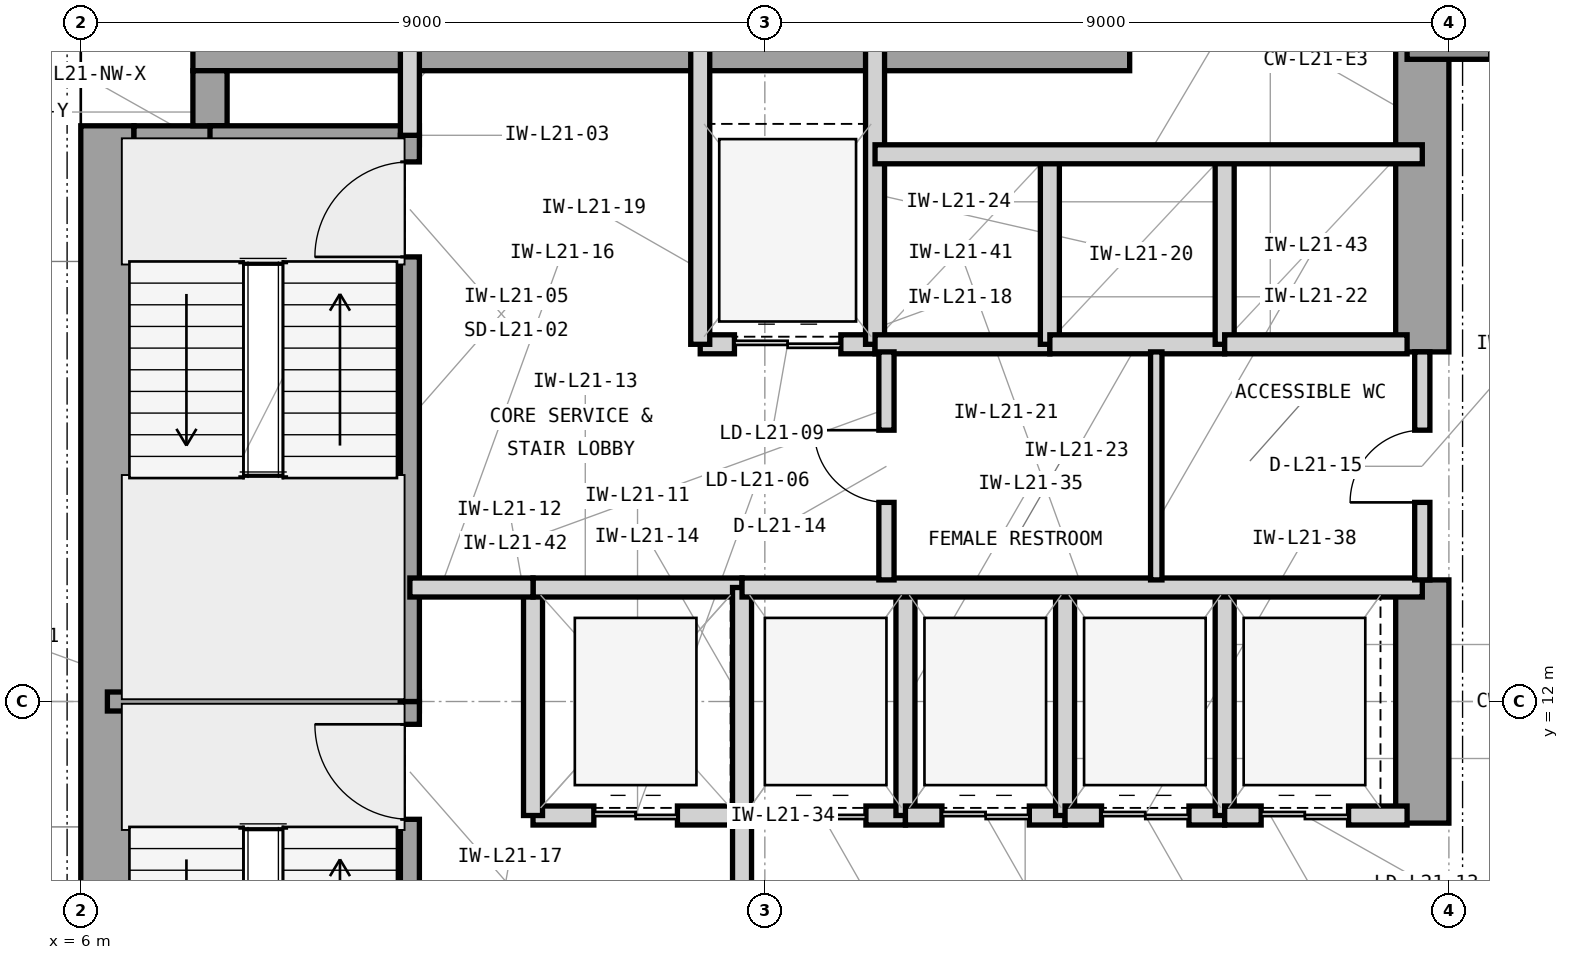
"""IFC4 building model, lengths in metres.
Left out: names, types, materials, properties, quantities, classifications, styles, units other than length and angle.
Written with IfcOpenShell. Run it as: python <this file> out.ifc"""

import sys

from ifc_helpers import new_model, si_unit, direction, frame, frame_2d, origin, origin_2d, place, context, subcontext, project, spatial, rectangle, extrude, element, fill, save


model = new_model("IFC4")
c1 = context("Model", 3, precision=1e-05, world=origin(), true_north=direction((0.0, 1.0)))
c2 = subcontext(c1, "Body", "Model", "MODEL_VIEW")
j1 = project(units=[si_unit("LENGTHUNIT", "METRE"), si_unit("PLANEANGLEUNIT", "RADIAN")], contexts=[c1])
p1 = place(None, origin())
s1 = spatial("IfcSite", under=j1, at=p1, CompositionType="ELEMENT")
p2 = place(p1, origin())
s2 = spatial("IfcBuilding", under=s1, at=p2, CompositionType="ELEMENT")
p3 = place(p2, frame((0.0, 0.0, 93.3)))
s3 = spatial("IfcBuildingStorey", under=s2, at=p3, CompositionType="ELEMENT", Elevation=93.3)
p4 = place(p3, frame((6.35, 4.425, 0.0), z_axis=(0.0, 0.0, 1.0), x_axis=(0.0, 1.0, 0.0)))
e1 = element("IfcWall", 1, at=p4, inside=s3, PredefinedType="SHEAR", context=c2, shape_type="SweptSolid", body=[
    extrude(rectangle(XDim=15.15, YDim=0.7, at=frame_2d((7.575, 0.0))), origin(), (0.0, 0.0, 1.0), 3.9),
])
p5 = place(p3, frame((7.475, 20.65, 0.0), z_axis=(0.0, 0.0, 1.0), x_axis=(1.0, 0.0, 0.0)))
e2 = element("IfcWall", 2, at=p5, inside=s3, PredefinedType="SHEAR", context=c2, shape_type="SweptSolid", body=[
    extrude(rectangle(XDim=12.325, YDim=0.7, at=frame_2d((6.163, 0.0))), origin(), (0.0, 0.0, 1.0), 3.9),
])
p6 = place(p3, frame((23.65, 10.4, 0.0), z_axis=(0.0, 0.0, 1.0), x_axis=(0.0, 1.0, 0.0)))
e3 = element("IfcWall", 3, at=p6, inside=s3, PredefinedType="SHEAR", context=c2, shape_type="SweptSolid", body=[
    extrude(rectangle(XDim=3.2, YDim=0.7, at=frame_2d((1.6, 0.0))), origin(), (0.0, 0.0, 1.0), 3.9),
])
p7 = place(p3, frame((23.65, 16.6, 0.0), z_axis=(0.0, 0.0, 1.0), x_axis=(0.0, 1.0, 0.0)))
e4 = element("IfcWall", 4, at=p7, inside=s3, PredefinedType="SHEAR", context=c2, shape_type="SweptSolid", body=[
    extrude(rectangle(XDim=4.05, YDim=0.7, at=frame_2d((2.025, 0.0))), origin(), (0.0, 0.0, 1.0), 3.9),
])
p8 = place(p3, frame((6.7, 19.35, 0.0), z_axis=(0.0, 0.0, 1.0), x_axis=(1.0, 0.0, 0.0)))
e5 = element("IfcWall", 5, at=p8, inside=s3, PredefinedType="SHEAR", context=c2, shape_type="SweptSolid", body=[
    extrude(rectangle(XDim=1.225, YDim=0.45, at=frame_2d((0.613, 0.0))), origin(), (0.0, 0.0, 1.0), 3.9),
])
p9 = place(p3, frame((7.7, 19.575, 0.0), z_axis=(0.0, 0.0, 1.0), x_axis=(0.0, 1.0, 0.0)))
e6 = element("IfcWall", 6, at=p9, inside=s3, PredefinedType="SHEAR", context=c2, shape_type="SweptSolid", body=[
    extrude(rectangle(XDim=0.725, YDim=0.45, at=frame_2d((0.363, 0.0))), origin(), (0.0, 0.0, 1.0), 3.9),
])
p10 = place(p3, frame((24.0, 21.0, 0.0), z_axis=(0.0, 0.0, 1.0), x_axis=(1.0, 0.0, 0.0)))
e7 = element("IfcColumn", 7, at=p10, inside=s3, PredefinedType="COLUMN", context=c2, shape_type="SweptSolid", body=[
    extrude(rectangle(XDim=1.1, YDim=1.1, at=origin_2d()), origin(), (0.0, 0.0, 1.0), 3.9),
])
p11 = place(p3, frame((6.35, 12.0, 0.0), z_axis=(0.0, 0.0, 1.0), x_axis=(1.0, 0.0, 0.0)))
e8 = element("IfcWall", 8, at=p11, inside=s3, PredefinedType="SHEAR", context=c2, shape_type="SweptSolid", body=[
    extrude(rectangle(XDim=4.105, YDim=0.25, at=frame_2d((2.052, 0.0))), origin(), (0.0, 0.0, 1.0), 3.9),
])
p12 = place(p3, frame((7.7, 19.45, 0.0), z_axis=(0.0, 0.0, 1.0), x_axis=(1.0, 0.0, 0.0)))
e9 = element("IfcWall", 9, at=p12, inside=s3, PredefinedType="SHEAR", context=c2, shape_type="SweptSolid", body=[
    extrude(rectangle(XDim=2.755, YDim=0.25, at=frame_2d((1.377, 0.0))), origin(), (0.0, 0.0, 1.0), 3.9),
])
p13 = place(p3, frame((10.33, 4.55, 0.0), z_axis=(0.0, 0.0, 1.0), x_axis=(0.0, 1.0, 0.0)))
e10 = element("IfcWall", 10, at=p13, inside=s3, PredefinedType="SHEAR", context=c2, shape_type="SweptSolid", body=[
    extrude(rectangle(XDim=7.45, YDim=0.25, at=frame_2d((3.725, 0.0))), origin(), (0.0, 0.0, 1.0), 3.9),
])
p14 = place(p13, frame((5.9, 0.0, 0.0)))
e11 = element("IfcOpeningElement", 11, at=p14, cuts=e10, PredefinedType="OPENING", context=c2, shape_type="SweptSolid", body=[
    extrude(rectangle(XDim=1.25, YDim=2.2, at=frame_2d((0.625, 1.1))), frame((0.0, 0.135, 0.0), z_axis=(0.0, -1.0, 0.0), x_axis=(1.0, 0.0, 0.0)), (0.0, 0.0, 1.0), 0.27),
])
p15 = place(p3, frame((10.33, 12.0, 0.0), z_axis=(0.0, 0.0, 1.0), x_axis=(0.0, 1.0, 0.0)))
e12 = element("IfcWall", 12, at=p15, inside=s3, PredefinedType="SHEAR", context=c2, shape_type="SweptSolid", body=[
    extrude(rectangle(XDim=7.45, YDim=0.25, at=frame_2d((3.725, 0.0))), origin(), (0.0, 0.0, 1.0), 3.9),
])
p16 = place(p15, frame((5.85, 0.0, 0.0)))
e13 = element("IfcOpeningElement", 13, at=p16, cuts=e12, PredefinedType="OPENING", context=c2, shape_type="SweptSolid", body=[
    extrude(rectangle(XDim=1.25, YDim=2.2, at=frame_2d((0.625, 1.1))), frame((0.0, 0.135, 0.0), z_axis=(0.0, -1.0, 0.0), x_axis=(1.0, 0.0, 0.0)), (0.0, 0.0, 1.0), 0.27),
])
p17 = place(p3, frame((10.33, 19.45, 0.0), z_axis=(0.0, 0.0, 1.0), x_axis=(0.0, 1.0, 0.0)))
e14 = element("IfcWall", 14, at=p17, inside=s3, PredefinedType="PARTITIONING", context=c2, shape_type="SweptSolid", body=[
    extrude(rectangle(XDim=1.2, YDim=0.25, at=frame_2d((0.6, 0.0))), origin(), (0.0, 0.0, 1.0), 2.917),
])
p18 = place(p3, frame((11.95, 10.5, 0.0), z_axis=(0.0, 0.0, 1.0), x_axis=(1.0, 0.0, 0.0)))
e15 = element("IfcWall", 15, at=p18, inside=s3, PredefinedType="PARTITIONING", context=c2, shape_type="SweptSolid", body=[
    extrude(rectangle(XDim=2.75, YDim=0.25, at=frame_2d((1.375, 0.0))), origin(), (0.0, 0.0, 1.0), 3.227),
])
p19 = place(p18, frame((0.8, 0.0, 0.0)))
e16 = element("IfcOpeningElement", 16, at=p19, cuts=e15, PredefinedType="OPENING", context=c2, shape_type="SweptSolid", body=[
    extrude(rectangle(XDim=1.1, YDim=2.25, at=frame_2d((0.55, 1.125))), frame((0.0, 0.135, 0.0), z_axis=(0.0, -1.0, 0.0), x_axis=(1.0, 0.0, 0.0)), (0.0, 0.0, 1.0), 0.27),
])
p20 = place(p3, frame((11.95, 10.5, 0.0), z_axis=(0.0, 0.0, 1.0), x_axis=(0.0, 1.0, 0.0)))
e17 = element("IfcWall", 17, at=p20, inside=s3, PredefinedType="PARTITIONING", context=c2, shape_type="SweptSolid", body=[
    extrude(rectangle(XDim=3.0, YDim=0.25, at=frame_2d((1.5, 0.0))), origin(), (0.0, 0.0, 1.0), 3.69),
])
p21 = place(p3, frame((11.95, 13.5, 0.0), z_axis=(0.0, 0.0, 1.0), x_axis=(1.0, 0.0, 0.0)))
e18 = element("IfcWall", 18, at=p21, inside=s3, PredefinedType="PARTITIONING", context=c2, shape_type="SweptSolid", body=[
    extrude(rectangle(XDim=2.75, YDim=0.25, at=frame_2d((1.375, 0.0))), origin(), (0.0, 0.0, 1.0), 3.227),
])
p22 = place(p3, frame((14.7, 10.5, 0.0), z_axis=(0.0, 0.0, 1.0), x_axis=(0.0, 1.0, 0.0)))
e19 = element("IfcWall", 19, at=p22, inside=s3, PredefinedType="PARTITIONING", context=c2, shape_type="SweptSolid", body=[
    extrude(rectangle(XDim=3.0, YDim=0.25, at=frame_2d((1.5, 0.0))), origin(), (0.0, 0.0, 1.0), 3.69),
])
p23 = place(p3, frame((14.7, 6.7, 0.0), z_axis=(0.0, 0.0, 1.0), x_axis=(0.0, 1.0, 0.0)))
e20 = element("IfcWall", 20, at=p23, inside=s3, PredefinedType="PARTITIONING", context=c2, shape_type="SweptSolid", body=[
    extrude(rectangle(XDim=3.8, YDim=0.25, at=frame_2d((1.9, 0.0))), origin(), (0.0, 0.0, 1.0), 3.69),
])
p24 = place(p23, frame((1.3, 0.0, 0.0)))
e21 = element("IfcOpeningElement", 21, at=p24, cuts=e20, PredefinedType="OPENING", context=c2, shape_type="SweptSolid", body=[
    extrude(rectangle(XDim=1.2, YDim=2.2, at=frame_2d((0.6, 1.1))), frame((0.0, 0.135, 0.0), z_axis=(0.0, -1.0, 0.0), x_axis=(1.0, 0.0, 0.0)), (0.0, 0.0, 1.0), 0.27),
])
p25 = place(p3, frame((10.33, 13.5, 0.0), z_axis=(0.0, 0.0, 1.0), x_axis=(1.0, 0.0, 0.0)))
e22 = element("IfcWall", 22, at=p25, inside=s3, PredefinedType="PARTITIONING", context=c2, shape_type="SweptSolid", body=[
    extrude(rectangle(XDim=1.62, YDim=0.25, at=frame_2d((0.81, 0.0))), origin(), (0.0, 0.0, 1.0), 3.227),
])
p26 = place(p3, frame((14.15, 16.7, 0.0), z_axis=(0.0, 0.0, 1.0), x_axis=(1.0, 0.0, 0.0)))
e23 = element("IfcWall", 23, at=p26, inside=s3, PredefinedType="PARTITIONING", context=c2, shape_type="SweptSolid", body=[
    extrude(rectangle(XDim=2.3, YDim=0.25, at=frame_2d((1.15, 0.0))), origin(), (0.0, 0.0, 1.0), 3.227),
])
p27 = place(p26, frame((0.45, 0.0, 0.0)))
e24 = element("IfcOpeningElement", 24, at=p27, cuts=e23, PredefinedType="OPENING", context=c2, shape_type="SweptSolid", body=[
    extrude(rectangle(XDim=1.4, YDim=2.35, at=frame_2d((0.7, 1.175))), frame((0.0, 0.135, 0.0), z_axis=(0.0, -1.0, 0.0), x_axis=(1.0, 0.0, 0.0)), (0.0, 0.0, 1.0), 0.27),
])
for number, where, z_axis, x_axis in (
    (25, (14.15, 16.7, 0.0), (0.0, 0.0, 1.0), (0.0, 1.0, 0.0)),
    (26, (16.45, 16.7, 0.0), (0.0, 0.0, 1.0), (0.0, 1.0, 0.0)),
):
    element("IfcWall", number, at=place(p3, frame(where, z_axis=z_axis, x_axis=x_axis)), inside=s3, PredefinedType="PARTITIONING", context=c2, shape_type="SweptSolid", body=[
        extrude(rectangle(XDim=3.95, YDim=0.25, at=frame_2d((1.975, 0.0))), origin(), (0.0, 0.0, 1.0), 3.69),
    ])
p28 = place(p3, frame((16.45, 16.7, 0.0), z_axis=(0.0, 0.0, 1.0), x_axis=(1.0, 0.0, 0.0)))
e27 = element("IfcWall", 27, at=p28, inside=s3, PredefinedType="PARTITIONING", context=c2, shape_type="SweptSolid", body=[
    extrude(rectangle(XDim=2.3, YDim=0.25, at=frame_2d((1.15, 0.0))), origin(), (0.0, 0.0, 1.0), 3.227),
])
p29 = place(p3, frame((18.75, 16.7, 0.0), z_axis=(0.0, 0.0, 1.0), x_axis=(0.0, 1.0, 0.0)))
e28 = element("IfcWall", 28, at=p29, inside=s3, PredefinedType="PARTITIONING", context=c2, shape_type="SweptSolid", body=[
    extrude(rectangle(XDim=2.5, YDim=0.25, at=frame_2d((1.25, 0.0))), origin(), (0.0, 0.0, 1.0), 3.69),
])
p30 = place(p3, frame((18.75, 16.7, 0.0), z_axis=(0.0, 0.0, 1.0), x_axis=(1.0, 0.0, 0.0)))
e29 = element("IfcWall", 29, at=p30, inside=s3, PredefinedType="PARTITIONING", context=c2, shape_type="SweptSolid", body=[
    extrude(rectangle(XDim=2.3, YDim=0.25, at=frame_2d((1.15, 0.0))), origin(), (0.0, 0.0, 1.0), 3.227),
])
p31 = place(p3, frame((21.05, 16.7, 0.0), z_axis=(0.0, 0.0, 1.0), x_axis=(0.0, 1.0, 0.0)))
e30 = element("IfcWall", 30, at=p31, inside=s3, PredefinedType="PARTITIONING", context=c2, shape_type="SweptSolid", body=[
    extrude(rectangle(XDim=2.5, YDim=0.25, at=frame_2d((1.25, 0.0))), origin(), (0.0, 0.0, 1.0), 3.69),
])
p32 = place(p3, frame((21.05, 16.7, 0.0), z_axis=(0.0, 0.0, 1.0), x_axis=(1.0, 0.0, 0.0)))
e31 = element("IfcWall", 31, at=p32, inside=s3, PredefinedType="PARTITIONING", context=c2, shape_type="SweptSolid", body=[
    extrude(rectangle(XDim=2.4, YDim=0.25, at=frame_2d((1.2, 0.0))), origin(), (0.0, 0.0, 1.0), 3.227),
])
p33 = place(p3, frame((16.45, 19.2, 0.0), z_axis=(0.0, 0.0, 1.0), x_axis=(1.0, 0.0, 0.0)))
e32 = element("IfcWall", 32, at=p33, inside=s3, PredefinedType="PARTITIONING", context=c2, shape_type="SweptSolid", body=[
    extrude(rectangle(XDim=7.2, YDim=0.25, at=frame_2d((3.6, 0.0))), origin(), (0.0, 0.0, 1.0), 3.69),
])
p34 = place(p3, frame((14.7, 10.5, 0.0), z_axis=(0.0, 0.0, 1.0), x_axis=(1.0, 0.0, 0.0)))
e33 = element("IfcWall", 33, at=p34, inside=s3, PredefinedType="PARTITIONING", context=c2, shape_type="SweptSolid", body=[
    extrude(rectangle(XDim=2.15, YDim=0.25, at=frame_2d((1.075, 0.0))), origin(), (0.0, 0.0, 1.0), 3.227),
])
p35 = place(p34, frame((0.48, 0.0, 0.0)))
e34 = element("IfcOpeningElement", 34, at=p35, cuts=e33, PredefinedType="OPENING", context=c2, shape_type="SweptSolid", body=[
    extrude(rectangle(XDim=1.15, YDim=2.25, at=frame_2d((0.575, 1.125))), frame((0.0, 0.135, 0.0), z_axis=(0.0, -1.0, 0.0), x_axis=(1.0, 0.0, 0.0)), (0.0, 0.0, 1.0), 0.27),
])
p36 = place(p3, frame((16.85, 10.5, 0.0), z_axis=(0.0, 0.0, 1.0), x_axis=(0.0, 1.0, 0.0)))
e35 = element("IfcWall", 35, at=p36, inside=s3, PredefinedType="PARTITIONING", context=c2, shape_type="SweptSolid", body=[
    extrude(rectangle(XDim=3.0, YDim=0.25, at=frame_2d((1.5, 0.0))), origin(), (0.0, 0.0, 1.0), 3.69),
])
p37 = place(p3, frame((16.85, 10.5, 0.0), z_axis=(0.0, 0.0, 1.0), x_axis=(1.0, 0.0, 0.0)))
e36 = element("IfcWall", 36, at=p37, inside=s3, PredefinedType="PARTITIONING", context=c2, shape_type="SweptSolid", body=[
    extrude(rectangle(XDim=2.1, YDim=0.25, at=frame_2d((1.05, 0.0))), origin(), (0.0, 0.0, 1.0), 3.227),
])
p38 = place(p37, frame((0.48, 0.0, 0.0)))
e37 = element("IfcOpeningElement", 37, at=p38, cuts=e36, PredefinedType="OPENING", context=c2, shape_type="SweptSolid", body=[
    extrude(rectangle(XDim=1.15, YDim=2.25, at=frame_2d((0.575, 1.125))), frame((0.0, 0.135, 0.0), z_axis=(0.0, -1.0, 0.0), x_axis=(1.0, 0.0, 0.0)), (0.0, 0.0, 1.0), 0.27),
])
p39 = place(p3, frame((18.95, 10.5, 0.0), z_axis=(0.0, 0.0, 1.0), x_axis=(0.0, 1.0, 0.0)))
e38 = element("IfcWall", 38, at=p39, inside=s3, PredefinedType="PARTITIONING", context=c2, shape_type="SweptSolid", body=[
    extrude(rectangle(XDim=3.0, YDim=0.25, at=frame_2d((1.5, 0.0))), origin(), (0.0, 0.0, 1.0), 3.69),
])
p40 = place(p3, frame((18.95, 10.5, 0.0), z_axis=(0.0, 0.0, 1.0), x_axis=(1.0, 0.0, 0.0)))
e39 = element("IfcWall", 39, at=p40, inside=s3, PredefinedType="PARTITIONING", context=c2, shape_type="SweptSolid", body=[
    extrude(rectangle(XDim=2.1, YDim=0.25, at=frame_2d((1.05, 0.0))), origin(), (0.0, 0.0, 1.0), 3.227),
])
p41 = place(p40, frame((0.48, 0.0, 0.0)))
e40 = element("IfcOpeningElement", 40, at=p41, cuts=e39, PredefinedType="OPENING", context=c2, shape_type="SweptSolid", body=[
    extrude(rectangle(XDim=1.15, YDim=2.25, at=frame_2d((0.575, 1.125))), frame((0.0, 0.135, 0.0), z_axis=(0.0, -1.0, 0.0), x_axis=(1.0, 0.0, 0.0)), (0.0, 0.0, 1.0), 0.27),
])
p42 = place(p3, frame((21.05, 10.5, 0.0), z_axis=(0.0, 0.0, 1.0), x_axis=(0.0, 1.0, 0.0)))
e41 = element("IfcWall", 41, at=p42, inside=s3, PredefinedType="PARTITIONING", context=c2, shape_type="SweptSolid", body=[
    extrude(rectangle(XDim=3.0, YDim=0.25, at=frame_2d((1.5, 0.0))), origin(), (0.0, 0.0, 1.0), 3.69),
])
p43 = place(p3, frame((21.05, 10.5, 0.0), z_axis=(0.0, 0.0, 1.0), x_axis=(1.0, 0.0, 0.0)))
e42 = element("IfcWall", 42, at=p43, inside=s3, PredefinedType="PARTITIONING", context=c2, shape_type="SweptSolid", body=[
    extrude(rectangle(XDim=2.4, YDim=0.25, at=frame_2d((1.2, 0.0))), origin(), (0.0, 0.0, 1.0), 3.227),
])
p44 = place(p43, frame((0.48, 0.0, 0.0)))
e43 = element("IfcOpeningElement", 43, at=p44, cuts=e42, PredefinedType="OPENING", context=c2, shape_type="SweptSolid", body=[
    extrude(rectangle(XDim=1.15, YDim=2.25, at=frame_2d((0.575, 1.125))), frame((0.0, 0.135, 0.0), z_axis=(0.0, -1.0, 0.0), x_axis=(1.0, 0.0, 0.0)), (0.0, 0.0, 1.0), 0.27),
])
p45 = place(p3, frame((14.7, 13.5, 0.0), z_axis=(0.0, 0.0, 1.0), x_axis=(1.0, 0.0, 0.0)))
e44 = element("IfcWall", 44, at=p45, inside=s3, PredefinedType="PARTITIONING", context=c2, shape_type="SweptSolid", body=[
    extrude(rectangle(XDim=8.95, YDim=0.25, at=frame_2d((4.475, 0.0))), origin(), (0.0, 0.0, 1.0), 3.227),
])
p46 = place(p3, frame((16.6, 13.6, 0.0), z_axis=(0.0, 0.0, 1.0), x_axis=(0.0, 1.0, 0.0)))
e45 = element("IfcWall", 45, at=p46, inside=s3, PredefinedType="PARTITIONING", context=c2, shape_type="SweptSolid", body=[
    extrude(rectangle(XDim=3.0, YDim=0.2, at=frame_2d((1.5, 0.0))), origin(), (0.0, 0.0, 1.0), 3.69),
])
p47 = place(p46, frame((1.02, 0.0, 0.0)))
e46 = element("IfcOpeningElement", 46, at=p47, cuts=e45, PredefinedType="OPENING", context=c2, shape_type="SweptSolid", body=[
    extrude(rectangle(XDim=0.95, YDim=2.1, at=frame_2d((0.475, 1.05))), frame((0.0, 0.11, 0.0), z_axis=(0.0, -1.0, 0.0), x_axis=(1.0, 0.0, 0.0)), (0.0, 0.0, 1.0), 0.22),
])
p48 = place(p3, frame((20.15, 13.6, 0.0), z_axis=(0.0, 0.0, 1.0), x_axis=(0.0, 1.0, 0.0)))
e47 = element("IfcWall", 47, at=p48, inside=s3, PredefinedType="PARTITIONING", context=c2, shape_type="SweptSolid", body=[
    extrude(rectangle(XDim=3.0, YDim=0.15, at=frame_2d((1.5, 0.0))), origin(), (0.0, 0.0, 1.0), 3.69),
])
p49 = place(p3, frame((23.65, 13.6, 0.0), z_axis=(0.0, 0.0, 1.0), x_axis=(0.0, 1.0, 0.0)))
e48 = element("IfcWall", 48, at=p49, inside=s3, PredefinedType="PARTITIONING", context=c2, shape_type="SweptSolid", body=[
    extrude(rectangle(XDim=3.0, YDim=0.2, at=frame_2d((1.5, 0.0))), origin(), (0.0, 0.0, 1.0), 3.69),
])
p50 = place(p49, frame((1.02, 0.0, 0.0)))
e49 = element("IfcOpeningElement", 49, at=p50, cuts=e48, PredefinedType="OPENING", context=c2, shape_type="SweptSolid", body=[
    extrude(rectangle(XDim=0.95, YDim=2.1, at=frame_2d((0.475, 1.05))), frame((0.0, 0.11, 0.0), z_axis=(0.0, -1.0, 0.0), x_axis=(1.0, 0.0, 0.0)), (0.0, 0.0, 1.0), 0.22),
])
p51 = place(p14, origin())
e50 = element("IfcDoor", 50, at=p51, inside=s3, OperationType="SINGLE_SWING_RIGHT", PredefinedType="DOOR", context=c2, shape_type="SweptSolid", body=[
    extrude(rectangle(XDim=1.25, YDim=2.2, at=frame_2d((0.625, 1.1))), frame((0.0, 0.025, 0.0), z_axis=(0.0, -1.0, 0.0), x_axis=(1.0, 0.0, 0.0)), (0.0, 0.0, 1.0), 0.05),
])
fill(e11, e50)
p52 = place(p16, origin())
e51 = element("IfcDoor", 51, at=p52, inside=s3, OperationType="SINGLE_SWING_LEFT", PredefinedType="DOOR", context=c2, shape_type="SweptSolid", body=[
    extrude(rectangle(XDim=1.25, YDim=2.2, at=frame_2d((0.625, 1.1))), frame((0.0, 0.025, 0.0), z_axis=(0.0, -1.0, 0.0), x_axis=(1.0, 0.0, 0.0)), (0.0, 0.0, 1.0), 0.05),
])
fill(e13, e51)
p53 = place(p19, origin())
e52 = element("IfcDoor", 52, at=p53, inside=s3, OperationType="DOUBLE_DOOR_SLIDING", PredefinedType="DOOR", context=c2, shape_type="SweptSolid", body=[
    extrude(rectangle(XDim=1.1, YDim=2.25, at=frame_2d((0.55, 1.125))), frame((0.0, 0.025, 0.0), z_axis=(0.0, -1.0, 0.0), x_axis=(1.0, 0.0, 0.0)), (0.0, 0.0, 1.0), 0.05),
])
fill(e16, e52)
p54 = place(p27, origin())
e53 = element("IfcDoor", 53, at=p54, inside=s3, OperationType="DOUBLE_DOOR_SLIDING", PredefinedType="DOOR", context=c2, shape_type="SweptSolid", body=[
    extrude(rectangle(XDim=1.4, YDim=2.35, at=frame_2d((0.7, 1.175))), frame((0.0, 0.025, 0.0), z_axis=(0.0, -1.0, 0.0), x_axis=(1.0, 0.0, 0.0)), (0.0, 0.0, 1.0), 0.05),
])
fill(e24, e53)
p55 = place(p35, origin())
e54 = element("IfcDoor", 54, at=p55, inside=s3, OperationType="DOUBLE_DOOR_SLIDING", PredefinedType="DOOR", context=c2, shape_type="SweptSolid", body=[
    extrude(rectangle(XDim=1.15, YDim=2.25, at=frame_2d((0.575, 1.125))), frame((0.0, 0.025, 0.0), z_axis=(0.0, -1.0, 0.0), x_axis=(1.0, 0.0, 0.0)), (0.0, 0.0, 1.0), 0.05),
])
fill(e34, e54)
p56 = place(p38, origin())
e55 = element("IfcDoor", 55, at=p56, inside=s3, OperationType="DOUBLE_DOOR_SLIDING", PredefinedType="DOOR", context=c2, shape_type="SweptSolid", body=[
    extrude(rectangle(XDim=1.15, YDim=2.25, at=frame_2d((0.575, 1.125))), frame((0.0, 0.025, 0.0), z_axis=(0.0, -1.0, 0.0), x_axis=(1.0, 0.0, 0.0)), (0.0, 0.0, 1.0), 0.05),
])
fill(e37, e55)
p57 = place(p41, origin())
e56 = element("IfcDoor", 56, at=p57, inside=s3, OperationType="DOUBLE_DOOR_SLIDING", PredefinedType="DOOR", context=c2, shape_type="SweptSolid", body=[
    extrude(rectangle(XDim=1.15, YDim=2.25, at=frame_2d((0.575, 1.125))), frame((0.0, 0.025, 0.0), z_axis=(0.0, -1.0, 0.0), x_axis=(1.0, 0.0, 0.0)), (0.0, 0.0, 1.0), 0.05),
])
fill(e40, e56)
p58 = place(p44, origin())
e57 = element("IfcDoor", 57, at=p58, inside=s3, OperationType="DOUBLE_DOOR_SLIDING", PredefinedType="DOOR", context=c2, shape_type="SweptSolid", body=[
    extrude(rectangle(XDim=1.15, YDim=2.25, at=frame_2d((0.575, 1.125))), frame((0.0, 0.025, 0.0), z_axis=(0.0, -1.0, 0.0), x_axis=(1.0, 0.0, 0.0)), (0.0, 0.0, 1.0), 0.05),
])
fill(e43, e57)
p59 = place(p47, origin())
e58 = element("IfcDoor", 58, at=p59, inside=s3, OperationType="SINGLE_SWING_RIGHT", PredefinedType="DOOR", context=c2, shape_type="SweptSolid", body=[
    extrude(rectangle(XDim=0.95, YDim=2.1, at=frame_2d((0.475, 1.05))), frame((0.0, 0.025, 0.0), z_axis=(0.0, -1.0, 0.0), x_axis=(1.0, 0.0, 0.0)), (0.0, 0.0, 1.0), 0.05),
])
fill(e46, e58)
p60 = place(p50, origin())
e59 = element("IfcDoor", 59, at=p60, inside=s3, OperationType="SINGLE_SWING_LEFT", PredefinedType="DOOR", context=c2, shape_type="SweptSolid", body=[
    extrude(rectangle(XDim=0.95, YDim=2.1, at=frame_2d((0.475, 1.05))), frame((0.0, 0.025, 0.0), z_axis=(0.0, -1.0, 0.0), x_axis=(1.0, 0.0, 0.0)), (0.0, 0.0, 1.0), 0.05),
])
fill(e49, e59)
save(model, sys.argv[1])
